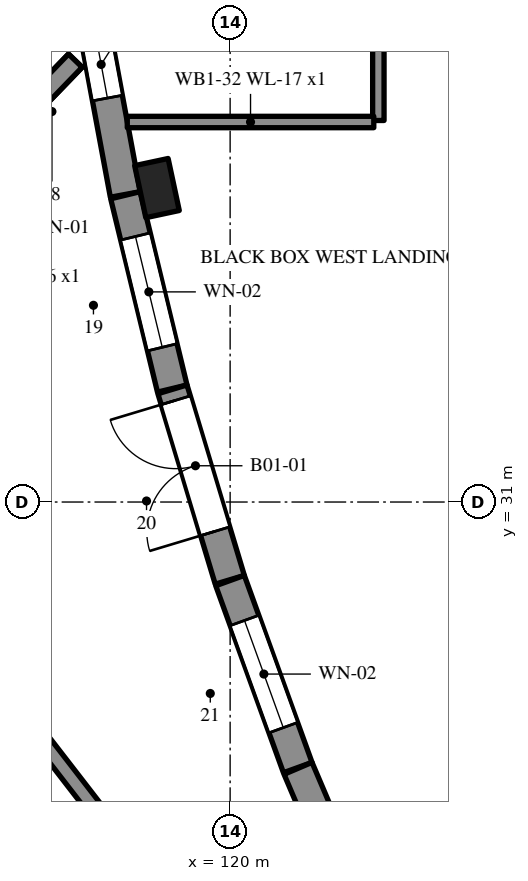
"""IFC4 building model, lengths in metres.
Left out: names, types, materials, properties, quantities, classifications, styles, units other than length and angle.
Written with IfcOpenShell. Run it as: python <this file> out.ifc"""

import sys

from ifc_helpers import new_model, si_unit, direction, frame, frame_2d, origin, origin_2d, place, context, subcontext, project, spatial, polyline, rectangle, outline, extrude, element, fill, save


model = new_model("IFC4")
c1 = context("Model", 3, precision=1e-05, world=origin(), true_north=direction((0.0, 1.0)))
c2 = subcontext(c1, "Body", "Model", "MODEL_VIEW")
j1 = project(units=[si_unit("LENGTHUNIT", "METRE"), si_unit("PLANEANGLEUNIT", "RADIAN")], contexts=[c1])
p1 = place(None, origin())
s1 = spatial("IfcSite", under=j1, at=p1, CompositionType="ELEMENT")
p2 = place(p1, origin())
s2 = spatial("IfcBuilding", under=s1, at=p2, CompositionType="ELEMENT")
p3 = place(p2, frame((0.0, 0.0, 5.4)))
s3 = spatial("IfcBuildingStorey", under=s2, at=p3, CompositionType="ELEMENT", Elevation=5.4)
p4 = place(p3, frame((118.165, 37.502, 0.0), z_axis=(0.0, 0.0, 1.0), x_axis=(0.182652956339, -0.983177449671, 0.0)))
e1 = element("IfcWall", 1, at=p4, inside=s3, PredefinedType="SOLIDWALL", context=c2, shape_type="SweptSolid", body=[
    extrude(rectangle(XDim=2.497, YDim=0.4, at=frame_2d((1.249, 0.0))), origin(), (0.0, 0.0, 1.0), 4.8),
])
p5 = place(p4, frame((0.307, 0.0, 0.9)))
e2 = element("IfcOpeningElement", 2, at=p5, cuts=e1, PredefinedType="OPENING", context=c2, shape_type="SweptSolid", body=[
    extrude(rectangle(XDim=0.9, YDim=2.1, at=frame_2d((0.45, 1.05))), frame((0.0, 0.21, 0.0), z_axis=(0.0, -1.0, 0.0), x_axis=(1.0, 0.0, 0.0)), (0.0, 0.0, 1.0), 0.42),
])
p6 = place(p3, frame((118.623, 35.037, 0.0), z_axis=(0.0, 0.0, 1.0), x_axis=(0.235108668597, -0.971969091047, 0.0)))
e3 = element("IfcWall", 3, at=p6, inside=s3, PredefinedType="SOLIDWALL", context=c2, shape_type="SweptSolid", body=[
    extrude(rectangle(XDim=2.617, YDim=0.4, at=frame_2d((1.308, 0.0))), origin(), (0.0, 0.0, 1.0), 4.8),
])
p7 = place(p6, frame((0.558, 0.0, 0.3)))
e4 = element("IfcOpeningElement", 4, at=p7, cuts=e3, PredefinedType="OPENING", context=c2, shape_type="SweptSolid", body=[
    extrude(rectangle(XDim=1.5, YDim=2.7, at=frame_2d((0.75, 1.35))), frame((0.0, 0.21, 0.0), z_axis=(0.0, -1.0, 0.0), x_axis=(1.0, 0.0, 0.0)), (0.0, 0.0, 1.0), 0.42),
])
p8 = place(p3, frame((119.241, 32.483, 0.0), z_axis=(0.0, 0.0, 1.0), x_axis=(0.288212317298, -0.957566530408, 0.0)))
e5 = element("IfcWall", 5, at=p8, inside=s3, PredefinedType="SOLIDWALL", context=c2, shape_type="SweptSolid", body=[
    extrude(rectangle(XDim=2.617, YDim=0.4, at=frame_2d((1.308, 0.0))), origin(), (0.0, 0.0, 1.0), 4.8),
])
p9 = place(p8, frame((0.15, 0.0, 0.0)))
e6 = element("IfcOpeningElement", 6, at=p9, cuts=e5, PredefinedType="OPENING", context=c2, shape_type="SweptSolid", body=[
    extrude(rectangle(XDim=1.8, YDim=2.1, at=frame_2d((0.9, 1.05))), frame((0.0, 0.21, 0.0), z_axis=(0.0, -1.0, 0.0), x_axis=(1.0, 0.0, 0.0)), (0.0, 0.0, 1.0), 0.42),
])
p10 = place(p3, frame((119.999, 29.967, 0.0), z_axis=(0.0, 0.0, 1.0), x_axis=(0.340394146267, -0.940282843184, 0.0)))
e7 = element("IfcWall", 7, at=p10, inside=s3, PredefinedType="SOLIDWALL", context=c2, shape_type="SweptSolid", body=[
    extrude(rectangle(XDim=2.616, YDim=0.4, at=frame_2d((1.308, 0.0))), origin(), (0.0, 0.0, 1.0), 4.8),
])
p11 = place(p10, frame((0.558, 0.0, 0.3)))
e8 = element("IfcOpeningElement", 8, at=p11, cuts=e7, PredefinedType="OPENING", context=c2, shape_type="SweptSolid", body=[
    extrude(rectangle(XDim=1.5, YDim=2.7, at=frame_2d((0.75, 1.35))), frame((0.0, 0.21, 0.0), z_axis=(0.0, -1.0, 0.0), x_axis=(1.0, 0.0, 0.0)), (0.0, 0.0, 1.0), 0.42),
])
p12 = place(p3, frame((120.893, 27.496, 0.0), z_axis=(0.0, 0.0, 1.0), x_axis=(0.391529943778, -0.920165367271, 0.0)))
e9 = element("IfcWall", 9, at=p12, inside=s3, PredefinedType="SOLIDWALL", context=c2, shape_type="SweptSolid", body=[
    extrude(rectangle(XDim=2.616, YDim=0.4, at=frame_2d((1.308, 0.0))), origin(), (0.0, 0.0, 1.0), 4.8),
])
p13 = place(p3, frame((119.037, 35.131, 0.0), z_axis=(0.0, 0.0, 1.0), x_axis=(0.20956121082, -0.977795530221, 0.0)))
e10 = element("IfcColumn", 10, at=p13, inside=s3, PredefinedType="PILASTER", context=c2, shape_type="SweptSolid", body=[
    extrude(rectangle(XDim=0.7, YDim=0.45, at=origin_2d()), origin(), (0.0, 0.0, 1.0), 4.8),
])
p14 = place(p3, frame((117.963, 36.807, 0.0), z_axis=(0.0, 0.0, 1.0), x_axis=(-0.694251740415, -0.71973225642, 0.0)))
e11 = element("IfcWall", 11, at=p14, inside=s3, PredefinedType="SHEAR", context=c2, shape_type="SweptSolid", body=[
    extrude(rectangle(XDim=2.645, YDim=0.25, at=frame_2d((1.322, 0.0))), origin(), (0.0, 0.0, 1.0), 4.421),
])
p15 = place(p14, frame((0.572, 0.0, 1.0)))
e12 = element("IfcOpeningElement", 12, at=p15, cuts=e11, PredefinedType="OPENING", context=c2, shape_type="SweptSolid", body=[
    extrude(rectangle(XDim=1.5, YDim=2.1, at=frame_2d((0.75, 1.05))), frame((0.0, 0.135, 0.0), z_axis=(0.0, -1.0, 0.0), x_axis=(1.0, 0.0, 0.0)), (0.0, 0.0, 1.0), 0.27),
])
p16 = place(p3, frame((117.963, 36.807, 4.421), z_axis=(0.0, 0.0, 1.0), x_axis=(-0.694251740415, -0.71973225642, 0.0)))
e13 = element("IfcWall", 13, at=p16, inside=s3, PredefinedType="SHEAR", context=c2, shape_type="SweptSolid", body=[
    extrude(outline(polyline([(0.0, 0.0), (2.645, 0.0), (2.645, 0.588), (0.0, 0.449), (0.0, 0.0)])), frame((0.0, 0.125, 0.0), z_axis=(0.0, -1.0, 0.0), x_axis=(1.0, 0.0, 0.0)), (0.0, 0.0, 1.0), 0.25),
])
p17 = place(p3, frame((121.95, 36.02, 0.0), z_axis=(0.0, 0.0, 1.0), x_axis=(0.0, 1.0, 0.0)))
e14 = element("IfcWall", 14, at=p17, inside=s3, PredefinedType="PARTITIONING", context=c2, shape_type="SweptSolid", body=[
    extrude(rectangle(XDim=6.46, YDim=0.15, at=frame_2d((3.23, 0.0))), origin(), (0.0, 0.0, 1.0), 4.5),
])
p18 = place(p17, frame((2.78, 0.0, 0.0)))
e15 = element("IfcOpeningElement", 15, at=p18, cuts=e14, PredefinedType="OPENING", context=c2, shape_type="SweptSolid", body=[
    extrude(rectangle(XDim=0.9, YDim=2.1, at=frame_2d((0.45, 1.05))), frame((0.0, 0.085, 0.0), z_axis=(0.0, -1.0, 0.0), x_axis=(1.0, 0.0, 0.0)), (0.0, 0.0, 1.0), 0.17),
])
p19 = place(p3, frame((118.647, 36.0, 0.0), z_axis=(0.0, 0.0, 1.0), x_axis=(1.0, 0.0, 0.0)))
e16 = element("IfcWall", 16, at=p19, inside=s3, PredefinedType="PARTITIONING", context=c2, shape_type="SweptSolid", body=[
    extrude(rectangle(XDim=3.243, YDim=0.15, at=frame_2d((1.622, 0.0))), origin(), (0.0, 0.0, 1.0), 4.5),
])
p20 = place(p3, frame((118.223, 26.961, 0.0), z_axis=(0.0, 0.0, 1.0), x_axis=(-0.61163509056, 0.791140010362, 0.0)))
e17 = element("IfcWall", 17, at=p20, inside=s3, PredefinedType="SHEAR", context=c2, shape_type="SweptSolid", body=[
    extrude(rectangle(XDim=8.0, YDim=0.2, at=frame_2d((4.0, 0.0))), origin(), (0.0, 0.0, 1.0), 4.531),
])
p21 = place(p9, frame((1.8, 0.0, 0.0), z_axis=(0.0, 0.0, 1.0), x_axis=(-1.0, 0.0, 0.0)))
e18 = element("IfcDoor", 18, at=p21, inside=s3, OperationType="DOUBLE_DOOR_SINGLE_SWING", PredefinedType="DOOR", context=c2, shape_type="SweptSolid", body=[
    extrude(rectangle(XDim=1.8, YDim=2.1, at=frame_2d((0.9, 1.05))), frame((0.0, 0.025, 0.0), z_axis=(0.0, -1.0, 0.0), x_axis=(1.0, 0.0, 0.0)), (0.0, 0.0, 1.0), 0.05),
])
fill(e6, e18)
p22 = place(p5, origin())
e19 = element("IfcWindow", 19, at=p22, inside=s3, PartitioningType="SINGLE_PANEL", PredefinedType="WINDOW", context=c2, shape_type="SweptSolid", body=[
    extrude(rectangle(XDim=0.9, YDim=2.1, at=frame_2d((0.45, 1.05))), frame((0.0, 0.03, 0.0), z_axis=(0.0, -1.0, 0.0), x_axis=(1.0, 0.0, 0.0)), (0.0, 0.0, 1.0), 0.06),
])
fill(e2, e19)
p23 = place(p7, origin())
e20 = element("IfcWindow", 20, at=p23, inside=s3, PartitioningType="SINGLE_PANEL", PredefinedType="WINDOW", context=c2, shape_type="SweptSolid", body=[
    extrude(rectangle(XDim=1.5, YDim=2.7, at=frame_2d((0.75, 1.35))), frame((0.0, 0.03, 0.0), z_axis=(0.0, -1.0, 0.0), x_axis=(1.0, 0.0, 0.0)), (0.0, 0.0, 1.0), 0.06),
])
fill(e4, e20)
p24 = place(p11, origin())
e21 = element("IfcWindow", 21, at=p24, inside=s3, PartitioningType="SINGLE_PANEL", PredefinedType="WINDOW", context=c2, shape_type="SweptSolid", body=[
    extrude(rectangle(XDim=1.5, YDim=2.7, at=frame_2d((0.75, 1.35))), frame((0.0, 0.03, 0.0), z_axis=(0.0, -1.0, 0.0), x_axis=(1.0, 0.0, 0.0)), (0.0, 0.0, 1.0), 0.06),
])
fill(e8, e21)
save(model, sys.argv[1])
